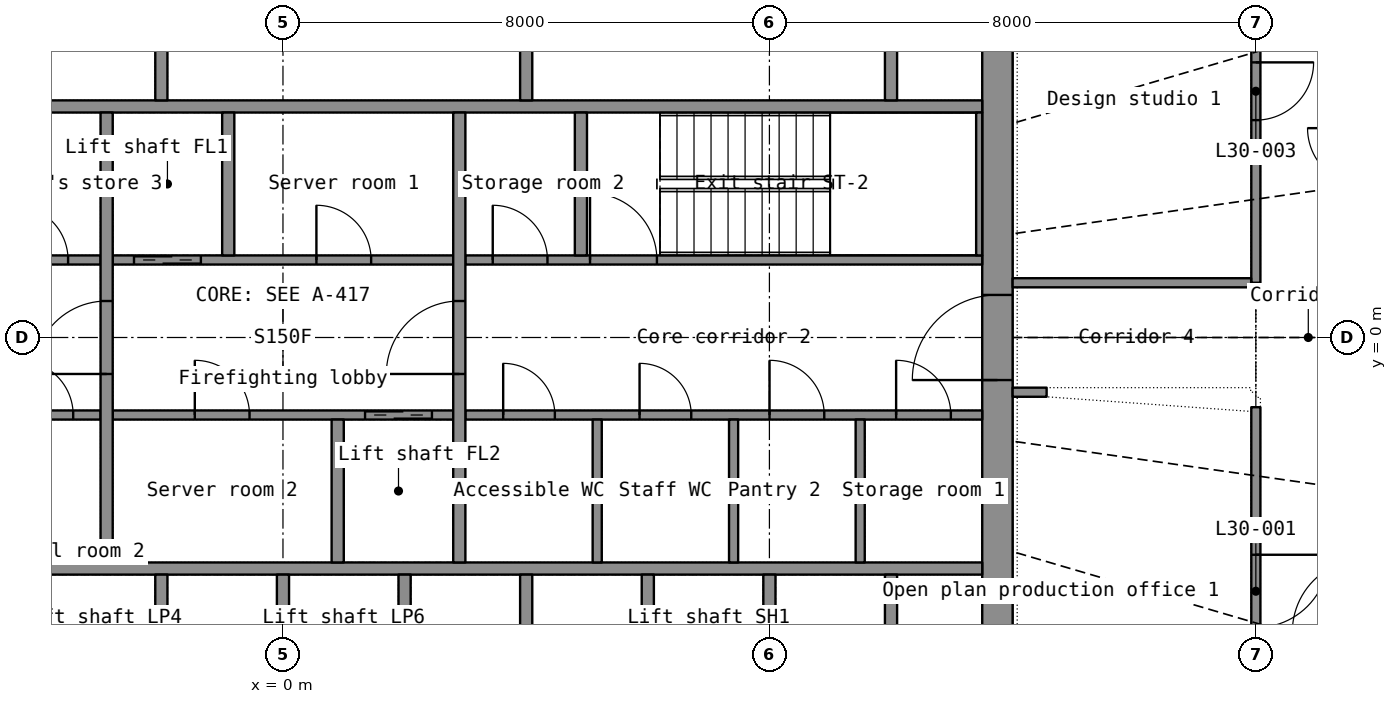
"""IFC4 building model, lengths in metres.
Left out: names, types, materials, properties, quantities, classifications, styles, units other than length and angle.
Written with IfcOpenShell. Run it as: python <this file> out.ifc"""

import sys

from ifc_helpers import new_model, si_unit, direction, frame, frame_2d, origin, place, context, subcontext, project, spatial, rectangle, extrude, element, fill, save


model = new_model("IFC4")
c1 = context("Model", 3, precision=1e-05, world=origin(), true_north=direction((0.0, 1.0)))
c2 = subcontext(c1, "Body", "Model", "MODEL_VIEW")
j1 = project(units=[si_unit("LENGTHUNIT", "METRE"), si_unit("PLANEANGLEUNIT", "RADIAN")], contexts=[c1])
p1 = place(None, origin())
s1 = spatial("IfcSite", under=j1, at=p1, CompositionType="ELEMENT")
p2 = place(p1, origin())
s2 = spatial("IfcBuilding", under=s1, at=p2, CompositionType="ELEMENT")
p3 = place(p2, frame((0.0, 0.0, 126.7)))
s3 = spatial("IfcBuildingStorey", under=s2, at=p3, CompositionType="ELEMENT", Elevation=126.7)
p4 = place(p3, frame((11.75, -7.2, 0.0), z_axis=(0.0, 0.0, 1.0), x_axis=(0.0, 1.0, 0.0)))
e1 = element("IfcWall", 1, at=p4, inside=s3, PredefinedType="SHEAR", context=c2, shape_type="SweptSolid", body=[
    extrude(rectangle(XDim=14.4, YDim=0.5, at=frame_2d((7.2, 0.0))), origin(), (0.0, 0.0, 1.0), 3.3),
])
p5 = place(p4, frame((6.5, 0.0, 0.0)))
e2 = element("IfcOpeningElement", 2, at=p5, cuts=e1, PredefinedType="OPENING", context=c2, shape_type="SweptSolid", body=[
    extrude(rectangle(XDim=1.4, YDim=2.2, at=frame_2d((0.7, 1.1))), frame((0.0, 0.26, 0.0), z_axis=(0.0, -1.0, 0.0), x_axis=(1.0, 0.0, 0.0)), (0.0, 0.0, 1.0), 0.52),
])
for number, where, z_axis, x_axis in (
    (3, (-11.5, -3.8, 0.0), (0.0, 0.0, 1.0), (1.0, 0.0, 0.0)),
    (4, (-11.5, 3.8, 0.0), (0.0, 0.0, 1.0), (1.0, 0.0, 0.0)),
):
    element("IfcWall", number, at=place(p3, frame(where, z_axis=z_axis, x_axis=x_axis)), inside=s3, PredefinedType="SHEAR", context=c2, shape_type="SweptSolid", body=[
        extrude(rectangle(XDim=23.0, YDim=0.2, at=frame_2d((11.5, 0.0))), origin(), (0.0, 0.0, 1.0), 3.3),
    ])
for number, where, z_axis, x_axis in (
    (5, (-2.0, -6.7, 0.0), (0.0, 0.0, 1.0), (0.0, 1.0, 0.0)),
    (6, (0.0, -6.7, 0.0), (0.0, 0.0, 1.0), (0.0, 1.0, 0.0)),
    (7, (2.0, -6.7, 0.0), (0.0, 0.0, 1.0), (0.0, 1.0, 0.0)),
    (8, (4.0, -6.7, 0.0), (0.0, 0.0, 1.0), (0.0, 1.0, 0.0)),
    (9, (6.0, -6.7, 0.0), (0.0, 0.0, 1.0), (0.0, 1.0, 0.0)),
    (10, (8.0, -6.7, 0.0), (0.0, 0.0, 1.0), (0.0, 1.0, 0.0)),
    (11, (10.0, -6.7, 0.0), (0.0, 0.0, 1.0), (0.0, 1.0, 0.0)),
    (12, (10.0, 3.9, 0.0), (0.0, 0.0, 1.0), (0.0, 1.0, 0.0)),
):
    element("IfcWall", number, at=place(p3, frame(where, z_axis=z_axis, x_axis=x_axis)), inside=s3, PredefinedType="SHEAR", context=c2, shape_type="SweptSolid", body=[
        extrude(rectangle(XDim=2.8, YDim=0.2, at=frame_2d((1.4, 0.0))), origin(), (0.0, 0.0, 1.0), 3.3),
    ])
for number, where, z_axis, x_axis in (
    (13, (-2.0, 3.9, 0.0), (0.0, 0.0, 1.0), (0.0, 1.0, 0.0)),
    (14, (4.0, 3.9, 0.0), (0.0, 0.0, 1.0), (0.0, 1.0, 0.0)),
):
    element("IfcWall", number, at=place(p3, frame(where, z_axis=z_axis, x_axis=x_axis)), inside=s3, PredefinedType="PARTITIONING", context=c2, shape_type="SweptSolid", body=[
        extrude(rectangle(XDim=2.8, YDim=0.2, at=frame_2d((1.4, 0.0))), origin(), (0.0, 0.0, 1.0), 3.3),
    ])
p6 = place(p3, frame((-11.5, -1.275, 0.0), z_axis=(0.0, 0.0, 1.0), x_axis=(1.0, 0.0, 0.0)))
e15 = element("IfcWall", 15, at=p6, inside=s3, PredefinedType="SHEAR", context=c2, shape_type="SweptSolid", body=[
    extrude(rectangle(XDim=8.5, YDim=0.15, at=frame_2d((4.25, 0.0))), origin(), (0.0, 0.0, 1.0), 3.3),
])
p7 = place(p6, frame((5.35, 0.0, 0.0)))
e16 = element("IfcOpeningElement", 16, at=p7, cuts=e15, PredefinedType="OPENING", context=c2, shape_type="SweptSolid", body=[
    extrude(rectangle(XDim=1.1, YDim=2.15, at=frame_2d((0.55, 1.075))), frame((0.0, 0.085, 0.0), z_axis=(0.0, -1.0, 0.0), x_axis=(1.0, 0.0, 0.0)), (0.0, 0.0, 1.0), 0.17),
])
p8 = place(p6, frame((7.15, 0.0, 0.0)))
e17 = element("IfcOpeningElement", 17, at=p8, cuts=e15, PredefinedType="OPENING", context=c2, shape_type="SweptSolid", body=[
    extrude(rectangle(XDim=0.9, YDim=2.1, at=frame_2d((0.45, 1.05))), frame((0.0, 0.085, 0.0), z_axis=(0.0, -1.0, 0.0), x_axis=(1.0, 0.0, 0.0)), (0.0, 0.0, 1.0), 0.17),
])
p9 = place(p3, frame((-2.8, -1.275, 0.0), z_axis=(0.0, 0.0, 1.0), x_axis=(1.0, 0.0, 0.0)))
e18 = element("IfcWall", 18, at=p9, inside=s3, PredefinedType="SHEAR", context=c2, shape_type="SweptSolid", body=[
    extrude(rectangle(XDim=5.6, YDim=0.15, at=frame_2d((2.8, 0.0))), origin(), (0.0, 0.0, 1.0), 3.3),
])
p10 = place(p9, frame((4.15, 0.0, 0.0)))
e19 = element("IfcOpeningElement", 19, at=p10, cuts=e18, PredefinedType="OPENING", context=c2, shape_type="SweptSolid", body=[
    extrude(rectangle(XDim=1.1, YDim=2.2, at=frame_2d((0.55, 1.1))), frame((0.0, 0.085, 0.0), z_axis=(0.0, -1.0, 0.0), x_axis=(1.0, 0.0, 0.0)), (0.0, 0.0, 1.0), 0.17),
])
p11 = place(p9, frame((1.35, 0.0, 0.0)))
e20 = element("IfcOpeningElement", 20, at=p11, cuts=e18, PredefinedType="OPENING", context=c2, shape_type="SweptSolid", body=[
    extrude(rectangle(XDim=0.9, YDim=2.1, at=frame_2d((0.45, 1.05))), frame((0.0, 0.085, 0.0), z_axis=(0.0, -1.0, 0.0), x_axis=(1.0, 0.0, 0.0)), (0.0, 0.0, 1.0), 0.17),
])
p12 = place(p3, frame((3.0, -1.275, 0.0), z_axis=(0.0, 0.0, 1.0), x_axis=(1.0, 0.0, 0.0)))
e21 = element("IfcWall", 21, at=p12, inside=s3, PredefinedType="PARTITIONING", context=c2, shape_type="SweptSolid", body=[
    extrude(rectangle(XDim=8.5, YDim=0.15, at=frame_2d((4.25, 0.0))), origin(), (0.0, 0.0, 1.0), 3.3),
])
p13 = place(p12, frame((0.622, 0.0, 0.0)))
e22 = element("IfcOpeningElement", 22, at=p13, cuts=e21, PredefinedType="OPENING", context=c2, shape_type="SweptSolid", body=[
    extrude(rectangle(XDim=0.85, YDim=2.1, at=frame_2d((0.425, 1.05))), frame((0.0, 0.085, 0.0), z_axis=(0.0, -1.0, 0.0), x_axis=(1.0, 0.0, 0.0)), (0.0, 0.0, 1.0), 0.17),
])
p14 = place(p12, frame((2.865, 0.0, 0.0)))
e23 = element("IfcOpeningElement", 23, at=p14, cuts=e21, PredefinedType="OPENING", context=c2, shape_type="SweptSolid", body=[
    extrude(rectangle(XDim=0.85, YDim=2.1, at=frame_2d((0.425, 1.05))), frame((0.0, 0.085, 0.0), z_axis=(0.0, -1.0, 0.0), x_axis=(1.0, 0.0, 0.0)), (0.0, 0.0, 1.0), 0.17),
])
p15 = place(p12, frame((5.002, 0.0, 0.0)))
e24 = element("IfcOpeningElement", 24, at=p15, cuts=e21, PredefinedType="OPENING", context=c2, shape_type="SweptSolid", body=[
    extrude(rectangle(XDim=0.9, YDim=2.1, at=frame_2d((0.45, 1.05))), frame((0.0, 0.085, 0.0), z_axis=(0.0, -1.0, 0.0), x_axis=(1.0, 0.0, 0.0)), (0.0, 0.0, 1.0), 0.17),
])
p16 = place(p12, frame((7.084, 0.0, 0.0)))
e25 = element("IfcOpeningElement", 25, at=p16, cuts=e21, PredefinedType="OPENING", context=c2, shape_type="SweptSolid", body=[
    extrude(rectangle(XDim=0.9, YDim=2.1, at=frame_2d((0.45, 1.05))), frame((0.0, 0.085, 0.0), z_axis=(0.0, -1.0, 0.0), x_axis=(1.0, 0.0, 0.0)), (0.0, 0.0, 1.0), 0.17),
])
p17 = place(p3, frame((-11.5, 1.275, 0.0), z_axis=(0.0, 0.0, 1.0), x_axis=(1.0, 0.0, 0.0)))
e26 = element("IfcWall", 26, at=p17, inside=s3, PredefinedType="PARTITIONING", context=c2, shape_type="SweptSolid", body=[
    extrude(rectangle(XDim=8.5, YDim=0.15, at=frame_2d((4.25, 0.0))), origin(), (0.0, 0.0, 1.0), 3.3),
])
p18 = place(p17, frame((1.133, 0.0, 0.0)))
e27 = element("IfcOpeningElement", 27, at=p18, cuts=e26, PredefinedType="OPENING", context=c2, shape_type="SweptSolid", body=[
    extrude(rectangle(XDim=0.85, YDim=2.1, at=frame_2d((0.425, 1.05))), frame((0.0, 0.085, 0.0), z_axis=(0.0, -1.0, 0.0), x_axis=(1.0, 0.0, 0.0)), (0.0, 0.0, 1.0), 0.17),
])
p19 = place(p17, frame((4.399, 0.0, 0.0)))
e28 = element("IfcOpeningElement", 28, at=p19, cuts=e26, PredefinedType="OPENING", context=c2, shape_type="SweptSolid", body=[
    extrude(rectangle(XDim=0.85, YDim=2.1, at=frame_2d((0.425, 1.05))), frame((0.0, 0.085, 0.0), z_axis=(0.0, -1.0, 0.0), x_axis=(1.0, 0.0, 0.0)), (0.0, 0.0, 1.0), 0.17),
])
p20 = place(p17, frame((7.066, 0.0, 0.0)))
e29 = element("IfcOpeningElement", 29, at=p20, cuts=e26, PredefinedType="OPENING", context=c2, shape_type="SweptSolid", body=[
    extrude(rectangle(XDim=0.9, YDim=2.1, at=frame_2d((0.45, 1.05))), frame((0.0, 0.085, 0.0), z_axis=(0.0, -1.0, 0.0), x_axis=(1.0, 0.0, 0.0)), (0.0, 0.0, 1.0), 0.17),
])
p21 = place(p3, frame((-2.8, 1.275, 0.0), z_axis=(0.0, 0.0, 1.0), x_axis=(1.0, 0.0, 0.0)))
e30 = element("IfcWall", 30, at=p21, inside=s3, PredefinedType="SHEAR", context=c2, shape_type="SweptSolid", body=[
    extrude(rectangle(XDim=5.6, YDim=0.15, at=frame_2d((2.8, 0.0))), origin(), (0.0, 0.0, 1.0), 3.3),
])
p22 = place(p21, frame((0.35, 0.0, 0.0)))
e31 = element("IfcOpeningElement", 31, at=p22, cuts=e30, PredefinedType="OPENING", context=c2, shape_type="SweptSolid", body=[
    extrude(rectangle(XDim=1.1, YDim=2.2, at=frame_2d((0.55, 1.1))), frame((0.0, 0.085, 0.0), z_axis=(0.0, -1.0, 0.0), x_axis=(1.0, 0.0, 0.0)), (0.0, 0.0, 1.0), 0.17),
])
p23 = place(p21, frame((3.35, 0.0, 0.0)))
e32 = element("IfcOpeningElement", 32, at=p23, cuts=e30, PredefinedType="OPENING", context=c2, shape_type="SweptSolid", body=[
    extrude(rectangle(XDim=0.9, YDim=2.1, at=frame_2d((0.45, 1.05))), frame((0.0, 0.085, 0.0), z_axis=(0.0, -1.0, 0.0), x_axis=(1.0, 0.0, 0.0)), (0.0, 0.0, 1.0), 0.17),
])
p24 = place(p3, frame((3.0, 1.275, 0.0), z_axis=(0.0, 0.0, 1.0), x_axis=(1.0, 0.0, 0.0)))
e33 = element("IfcWall", 33, at=p24, inside=s3, PredefinedType="SHEAR", context=c2, shape_type="SweptSolid", body=[
    extrude(rectangle(XDim=8.5, YDim=0.15, at=frame_2d((4.25, 0.0))), origin(), (0.0, 0.0, 1.0), 3.3),
])
p25 = place(p24, frame((2.05, 0.0, 0.0)))
e34 = element("IfcOpeningElement", 34, at=p25, cuts=e33, PredefinedType="OPENING", context=c2, shape_type="SweptSolid", body=[
    extrude(rectangle(XDim=1.1, YDim=2.15, at=frame_2d((0.55, 1.075))), frame((0.0, 0.085, 0.0), z_axis=(0.0, -1.0, 0.0), x_axis=(1.0, 0.0, 0.0)), (0.0, 0.0, 1.0), 0.17),
])
p26 = place(p24, frame((0.45, 0.0, 0.0)))
e35 = element("IfcOpeningElement", 35, at=p26, cuts=e33, PredefinedType="OPENING", context=c2, shape_type="SweptSolid", body=[
    extrude(rectangle(XDim=0.9, YDim=2.1, at=frame_2d((0.45, 1.05))), frame((0.0, 0.085, 0.0), z_axis=(0.0, -1.0, 0.0), x_axis=(1.0, 0.0, 0.0)), (0.0, 0.0, 1.0), 0.17),
])
p27 = place(p3, frame((-2.9, -3.7, 0.0), z_axis=(0.0, 0.0, 1.0), x_axis=(0.0, 1.0, 0.0)))
e36 = element("IfcWall", 36, at=p27, inside=s3, PredefinedType="SHEAR", context=c2, shape_type="SweptSolid", body=[
    extrude(rectangle(XDim=7.4, YDim=0.2, at=frame_2d((3.7, 0.0))), origin(), (0.0, 0.0, 1.0), 3.3),
])
p28 = place(p27, frame((3.1, 0.0, 0.0)))
e37 = element("IfcOpeningElement", 37, at=p28, cuts=e36, PredefinedType="OPENING", context=c2, shape_type="SweptSolid", body=[
    extrude(rectangle(XDim=1.2, YDim=2.2, at=frame_2d((0.6, 1.1))), frame((0.0, 0.11, 0.0), z_axis=(0.0, -1.0, 0.0), x_axis=(1.0, 0.0, 0.0)), (0.0, 0.0, 1.0), 0.22),
])
p29 = place(p3, frame((2.9, -3.7, 0.0), z_axis=(0.0, 0.0, 1.0), x_axis=(0.0, 1.0, 0.0)))
e38 = element("IfcWall", 38, at=p29, inside=s3, PredefinedType="SHEAR", context=c2, shape_type="SweptSolid", body=[
    extrude(rectangle(XDim=7.4, YDim=0.2, at=frame_2d((3.7, 0.0))), origin(), (0.0, 0.0, 1.0), 3.3),
])
p30 = place(p29, frame((3.1, 0.0, 0.0)))
e39 = element("IfcOpeningElement", 39, at=p30, cuts=e38, PredefinedType="OPENING", context=c2, shape_type="SweptSolid", body=[
    extrude(rectangle(XDim=1.2, YDim=2.2, at=frame_2d((0.6, 1.1))), frame((0.0, 0.11, 0.0), z_axis=(0.0, -1.0, 0.0), x_axis=(1.0, 0.0, 0.0)), (0.0, 0.0, 1.0), 0.22),
])
for number, where, z_axis, x_axis in (
    (40, (-0.9, 1.35, 0.0), (0.0, 0.0, 1.0), (0.0, 1.0, 0.0)),
    (41, (0.9, -3.7, 0.0), (0.0, 0.0, 1.0), (0.0, 1.0, 0.0)),
):
    element("IfcWall", number, at=place(p3, frame(where, z_axis=z_axis, x_axis=x_axis)), inside=s3, PredefinedType="SHEAR", context=c2, shape_type="SweptSolid", body=[
        extrude(rectangle(XDim=2.35, YDim=0.2, at=frame_2d((1.175, 0.0))), origin(), (0.0, 0.0, 1.0), 3.3),
    ])
p31 = place(p3, frame((11.45, 1.35, 0.0), z_axis=(0.0, 0.0, 1.0), x_axis=(0.0, 1.0, 0.0)))
e42 = element("IfcWall", 42, at=p31, inside=s3, PredefinedType="SHEAR", context=c2, shape_type="SweptSolid", body=[
    extrude(rectangle(XDim=2.35, YDim=0.1, at=frame_2d((1.175, 0.0))), origin(), (0.0, 0.0, 1.0), 3.3),
])
p32 = place(p3, frame((4.9, 1.35, 0.0), z_axis=(0.0, 0.0, 1.0), x_axis=(0.0, 1.0, 0.0)))
e43 = element("IfcWall", 43, at=p32, inside=s3, PredefinedType="SHEAR", context=c2, shape_type="SweptSolid", body=[
    extrude(rectangle(XDim=2.35, YDim=0.2, at=frame_2d((1.175, 0.0))), origin(), (0.0, 0.0, 1.0), 3.3),
])
for number, where, z_axis, x_axis in (
    (44, (5.168, -3.7, 0.0), (0.0, 0.0, 1.0), (0.0, 1.0, 0.0)),
    (45, (7.411, -3.7, 0.0), (0.0, 0.0, 1.0), (0.0, 1.0, 0.0)),
    (46, (9.493, -3.7, 0.0), (0.0, 0.0, 1.0), (0.0, 1.0, 0.0)),
):
    element("IfcWall", number, at=place(p3, frame(where, z_axis=z_axis, x_axis=x_axis)), inside=s3, PredefinedType="PARTITIONING", context=c2, shape_type="SweptSolid", body=[
        extrude(rectangle(XDim=2.35, YDim=0.15, at=frame_2d((1.175, 0.0))), origin(), (0.0, 0.0, 1.0), 3.3),
    ])
p33 = place(p3, frame((16.0, 7.2, 0.0), z_axis=(0.0, 0.0, 1.0), x_axis=(0.0, -1.0, 0.0)))
e47 = element("IfcWall", 47, at=p33, inside=s3, PredefinedType="PARTITIONING", context=c2, shape_type="SweptSolid", body=[
    extrude(rectangle(XDim=6.3, YDim=0.15, at=frame_2d((3.15, 0.0))), origin(), (0.0, 0.0, 1.0), 2.4),
])
p34 = place(p33, frame((2.675, 0.0, 0.0)))
e48 = element("IfcOpeningElement", 48, at=p34, cuts=e47, PredefinedType="OPENING", context=c2, shape_type="SweptSolid", body=[
    extrude(rectangle(XDim=0.95, YDim=2.15, at=frame_2d((0.475, 1.075))), frame((0.0, 0.085, 0.0), z_axis=(0.0, -1.0, 0.0), x_axis=(1.0, 0.0, 0.0)), (0.0, 0.0, 1.0), 0.17),
])
p35 = place(p3, frame((16.0, -1.146, 0.0), z_axis=(0.0, 0.0, 1.0), x_axis=(0.0, -1.0, 0.0)))
e49 = element("IfcWall", 49, at=p35, inside=s3, PredefinedType="PARTITIONING", context=c2, shape_type="SweptSolid", body=[
    extrude(rectangle(XDim=6.053, YDim=0.15, at=frame_2d((3.027, 0.0))), origin(), (0.0, 0.0, 1.0), 2.4),
])
p36 = place(p35, frame((2.427, 0.0, 0.0)))
e50 = element("IfcOpeningElement", 50, at=p36, cuts=e49, PredefinedType="OPENING", context=c2, shape_type="SweptSolid", body=[
    extrude(rectangle(XDim=1.2, YDim=2.2, at=frame_2d((0.6, 1.1))), frame((0.0, 0.085, 0.0), z_axis=(0.0, -1.0, 0.0), x_axis=(1.0, 0.0, 0.0)), (0.0, 0.0, 1.0), 0.17),
])
p37 = place(p3, frame((15.923, 0.9, 0.0), z_axis=(0.0, 0.0, 1.0), x_axis=(-1.0, 0.0, 0.0)))
e51 = element("IfcWall", 51, at=p37, inside=s3, PredefinedType="PARTITIONING", context=c2, shape_type="SweptSolid", body=[
    extrude(rectangle(XDim=3.923, YDim=0.15, at=frame_2d((1.961, 0.0))), origin(), (0.0, 0.0, 1.0), 2.4),
])
p38 = place(p3, frame((12.0, -0.9, 0.0), z_axis=(0.0, 0.0, 1.0), x_axis=(1.0, 0.0, 0.0)))
e52 = element("IfcWall", 52, at=p38, inside=s3, PredefinedType="PARTITIONING", context=c2, shape_type="SweptSolid", body=[
    extrude(rectangle(XDim=0.559, YDim=0.15, at=frame_2d((0.28, 0.0))), origin(), (0.0, 0.0, 1.0), 2.4),
])
p39 = place(p5, origin())
e53 = element("IfcDoor", 53, at=p39, inside=s3, OperationType="DOUBLE_DOOR_SINGLE_SWING", PredefinedType="DOOR", context=c2, shape_type="SweptSolid", body=[
    extrude(rectangle(XDim=1.4, YDim=2.2, at=frame_2d((0.7, 1.1))), frame((0.0, 0.025, 0.0), z_axis=(0.0, -1.0, 0.0), x_axis=(1.0, 0.0, 0.0)), (0.0, 0.0, 1.0), 0.05),
])
fill(e2, e53)
p40 = place(p28, origin())
e54 = element("IfcDoor", 54, at=p40, inside=s3, OperationType="SINGLE_SWING_LEFT", PredefinedType="DOOR", context=c2, shape_type="SweptSolid", body=[
    extrude(rectangle(XDim=1.2, YDim=2.2, at=frame_2d((0.6, 1.1))), frame((0.0, 0.025, 0.0), z_axis=(0.0, -1.0, 0.0), x_axis=(1.0, 0.0, 0.0)), (0.0, 0.0, 1.0), 0.05),
])
fill(e37, e54)
p41 = place(p30, origin())
e55 = element("IfcDoor", 55, at=p41, inside=s3, OperationType="SINGLE_SWING_LEFT", PredefinedType="DOOR", context=c2, shape_type="SweptSolid", body=[
    extrude(rectangle(XDim=1.2, YDim=2.2, at=frame_2d((0.6, 1.1))), frame((0.0, 0.025, 0.0), z_axis=(0.0, -1.0, 0.0), x_axis=(1.0, 0.0, 0.0)), (0.0, 0.0, 1.0), 0.05),
])
fill(e39, e55)
p42 = place(p22, origin())
e56 = element("IfcDoor", 56, at=p42, inside=s3, OperationType="DOUBLE_DOOR_SLIDING", PredefinedType="DOOR", context=c2, shape_type="SweptSolid", body=[
    extrude(rectangle(XDim=1.1, YDim=2.2, at=frame_2d((0.55, 1.1))), frame((0.0, 0.025, 0.0), z_axis=(0.0, -1.0, 0.0), x_axis=(1.0, 0.0, 0.0)), (0.0, 0.0, 1.0), 0.05),
])
fill(e31, e56)
p43 = place(p10, origin())
e57 = element("IfcDoor", 57, at=p43, inside=s3, OperationType="DOUBLE_DOOR_SLIDING", PredefinedType="DOOR", context=c2, shape_type="SweptSolid", body=[
    extrude(rectangle(XDim=1.1, YDim=2.2, at=frame_2d((0.55, 1.1))), frame((0.0, 0.025, 0.0), z_axis=(0.0, -1.0, 0.0), x_axis=(1.0, 0.0, 0.0)), (0.0, 0.0, 1.0), 0.05),
])
fill(e19, e57)
p44 = place(p25, origin())
e58 = element("IfcDoor", 58, at=p44, inside=s3, OperationType="SINGLE_SWING_LEFT", PredefinedType="DOOR", context=c2, shape_type="SweptSolid", body=[
    extrude(rectangle(XDim=1.1, YDim=2.15, at=frame_2d((0.55, 1.075))), frame((0.0, 0.025, 0.0), z_axis=(0.0, -1.0, 0.0), x_axis=(1.0, 0.0, 0.0)), (0.0, 0.0, 1.0), 0.05),
])
fill(e34, e58)
p45 = place(p20, origin())
e59 = element("IfcDoor", 59, at=p45, inside=s3, OperationType="SINGLE_SWING_LEFT", PredefinedType="DOOR", context=c2, shape_type="SweptSolid", body=[
    extrude(rectangle(XDim=0.9, YDim=2.1, at=frame_2d((0.45, 1.05))), frame((0.0, 0.025, 0.0), z_axis=(0.0, -1.0, 0.0), x_axis=(1.0, 0.0, 0.0)), (0.0, 0.0, 1.0), 0.05),
])
fill(e29, e59)
p46 = place(p13, origin())
e60 = element("IfcDoor", 60, at=p46, inside=s3, OperationType="SINGLE_SWING_LEFT", PredefinedType="DOOR", context=c2, shape_type="SweptSolid", body=[
    extrude(rectangle(XDim=0.85, YDim=2.1, at=frame_2d((0.425, 1.05))), frame((0.0, 0.025, 0.0), z_axis=(0.0, -1.0, 0.0), x_axis=(1.0, 0.0, 0.0)), (0.0, 0.0, 1.0), 0.05),
])
fill(e22, e60)
p47 = place(p14, origin())
e61 = element("IfcDoor", 61, at=p47, inside=s3, OperationType="SINGLE_SWING_LEFT", PredefinedType="DOOR", context=c2, shape_type="SweptSolid", body=[
    extrude(rectangle(XDim=0.85, YDim=2.1, at=frame_2d((0.425, 1.05))), frame((0.0, 0.025, 0.0), z_axis=(0.0, -1.0, 0.0), x_axis=(1.0, 0.0, 0.0)), (0.0, 0.0, 1.0), 0.05),
])
fill(e23, e61)
p48 = place(p15, origin())
e62 = element("IfcDoor", 62, at=p48, inside=s3, OperationType="SINGLE_SWING_LEFT", PredefinedType="DOOR", context=c2, shape_type="SweptSolid", body=[
    extrude(rectangle(XDim=0.9, YDim=2.1, at=frame_2d((0.45, 1.05))), frame((0.0, 0.025, 0.0), z_axis=(0.0, -1.0, 0.0), x_axis=(1.0, 0.0, 0.0)), (0.0, 0.0, 1.0), 0.05),
])
fill(e24, e62)
p49 = place(p16, origin())
e63 = element("IfcDoor", 63, at=p49, inside=s3, OperationType="SINGLE_SWING_LEFT", PredefinedType="DOOR", context=c2, shape_type="SweptSolid", body=[
    extrude(rectangle(XDim=0.9, YDim=2.1, at=frame_2d((0.45, 1.05))), frame((0.0, 0.025, 0.0), z_axis=(0.0, -1.0, 0.0), x_axis=(1.0, 0.0, 0.0)), (0.0, 0.0, 1.0), 0.05),
])
fill(e25, e63)
p50 = place(p23, origin())
e64 = element("IfcDoor", 64, at=p50, inside=s3, OperationType="SINGLE_SWING_LEFT", PredefinedType="DOOR", context=c2, shape_type="SweptSolid", body=[
    extrude(rectangle(XDim=0.9, YDim=2.1, at=frame_2d((0.45, 1.05))), frame((0.0, 0.025, 0.0), z_axis=(0.0, -1.0, 0.0), x_axis=(1.0, 0.0, 0.0)), (0.0, 0.0, 1.0), 0.05),
])
fill(e32, e64)
p51 = place(p11, origin())
e65 = element("IfcDoor", 65, at=p51, inside=s3, OperationType="SINGLE_SWING_LEFT", PredefinedType="DOOR", context=c2, shape_type="SweptSolid", body=[
    extrude(rectangle(XDim=0.9, YDim=2.1, at=frame_2d((0.45, 1.05))), frame((0.0, 0.025, 0.0), z_axis=(0.0, -1.0, 0.0), x_axis=(1.0, 0.0, 0.0)), (0.0, 0.0, 1.0), 0.05),
])
fill(e20, e65)
p52 = place(p26, origin())
e66 = element("IfcDoor", 66, at=p52, inside=s3, OperationType="SINGLE_SWING_LEFT", PredefinedType="DOOR", context=c2, shape_type="SweptSolid", body=[
    extrude(rectangle(XDim=0.9, YDim=2.1, at=frame_2d((0.45, 1.05))), frame((0.0, 0.025, 0.0), z_axis=(0.0, -1.0, 0.0), x_axis=(1.0, 0.0, 0.0)), (0.0, 0.0, 1.0), 0.05),
])
fill(e35, e66)
p53 = place(p8, origin())
e67 = element("IfcDoor", 67, at=p53, inside=s3, OperationType="SINGLE_SWING_LEFT", PredefinedType="DOOR", context=c2, shape_type="SweptSolid", body=[
    extrude(rectangle(XDim=0.9, YDim=2.1, at=frame_2d((0.45, 1.05))), frame((0.0, 0.025, 0.0), z_axis=(0.0, -1.0, 0.0), x_axis=(1.0, 0.0, 0.0)), (0.0, 0.0, 1.0), 0.05),
])
fill(e17, e67)
p54 = place(p36, origin())
e68 = element("IfcDoor", 68, at=p54, inside=s3, OperationType="DOUBLE_DOOR_SINGLE_SWING", PredefinedType="DOOR", context=c2, shape_type="SweptSolid", body=[
    extrude(rectangle(XDim=1.2, YDim=2.2, at=frame_2d((0.6, 1.1))), frame((0.0, 0.025, 0.0), z_axis=(0.0, -1.0, 0.0), x_axis=(1.0, 0.0, 0.0)), (0.0, 0.0, 1.0), 0.05),
])
fill(e50, e68)
p55 = place(p34, origin())
e69 = element("IfcDoor", 69, at=p55, inside=s3, OperationType="SINGLE_SWING_LEFT", PredefinedType="DOOR", context=c2, shape_type="SweptSolid", body=[
    extrude(rectangle(XDim=0.95, YDim=2.15, at=frame_2d((0.475, 1.075))), frame((0.0, 0.025, 0.0), z_axis=(0.0, -1.0, 0.0), x_axis=(1.0, 0.0, 0.0)), (0.0, 0.0, 1.0), 0.05),
])
fill(e48, e69)
save(model, sys.argv[1])
